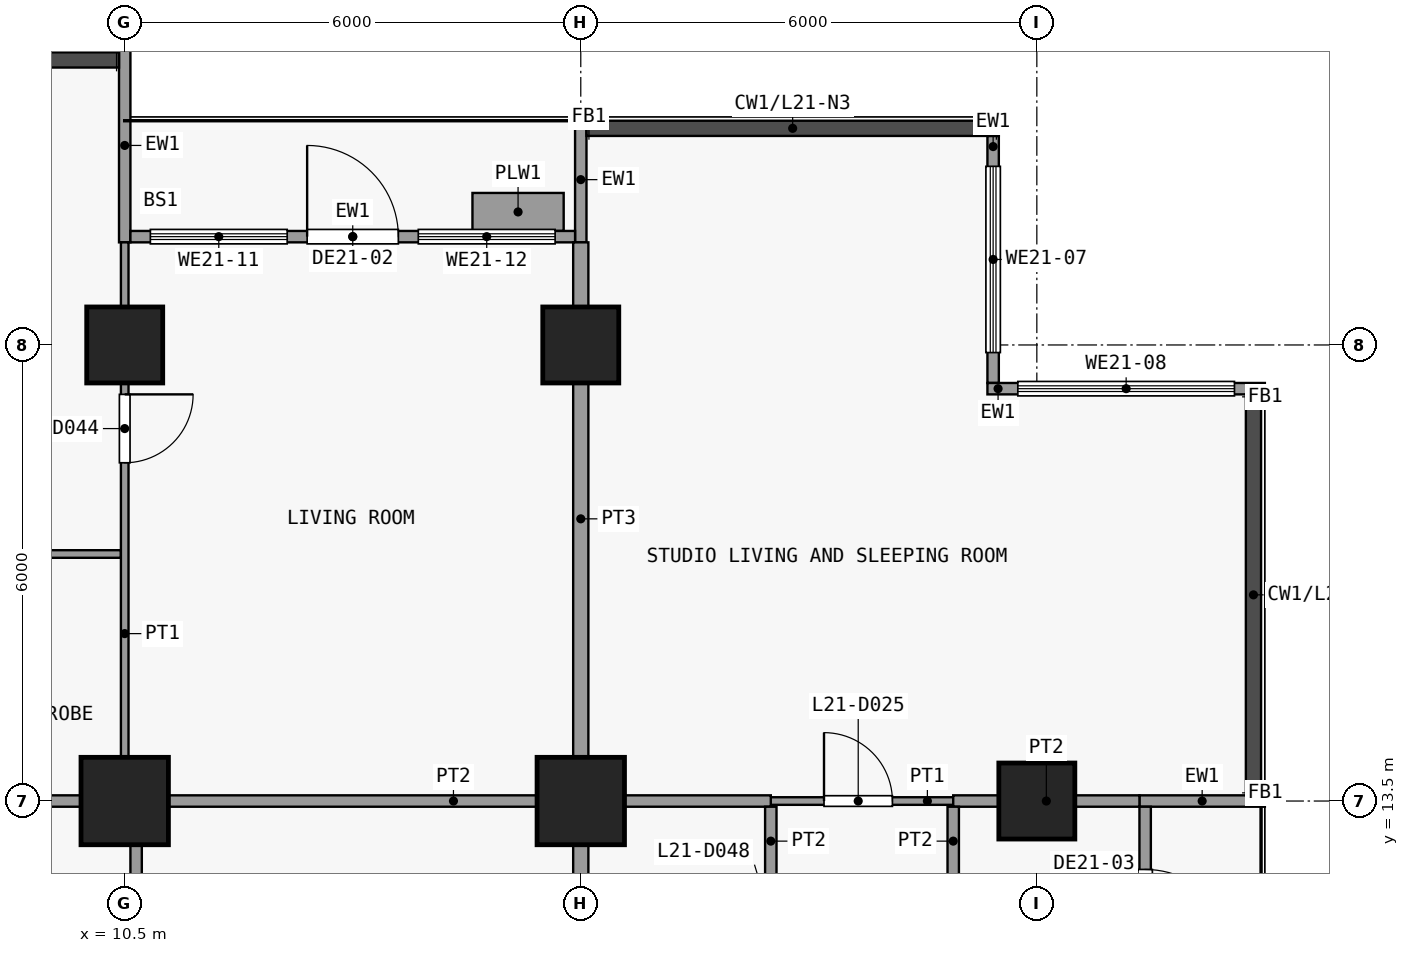
"""IFC4 building model, lengths in metres.
Left out: names, types, materials, properties, quantities, classifications, styles, units other than length and angle.
Written with IfcOpenShell. Run it as: python <this file> out.ifc"""

import sys

from ifc_helpers import new_model, si_unit, direction, frame, frame_2d, origin, origin_2d, place, context, subcontext, project, spatial, rectangle, extrude, element, fill, save


model = new_model("IFC4")
c1 = context("Model", 3, precision=1e-05, world=origin(), true_north=direction((0.0, 1.0)))
c2 = subcontext(c1, "Body", "Model", "MODEL_VIEW")
j1 = project(units=[si_unit("LENGTHUNIT", "METRE"), si_unit("PLANEANGLEUNIT", "RADIAN")], contexts=[c1])
p1 = place(None, origin())
s1 = spatial("IfcSite", under=j1, at=p1, CompositionType="ELEMENT")
p2 = place(p1, origin())
s2 = spatial("IfcBuilding", under=s1, at=p2, CompositionType="ELEMENT")
p3 = place(p2, frame((0.0, 0.0, 88.3)))
s3 = spatial("IfcBuildingStorey", under=s2, at=p3, CompositionType="ELEMENT", Elevation=88.3)
p4 = place(p3, frame((10.5, 13.5, 0.0), z_axis=(0.0, 0.0, 1.0), x_axis=(1.0, 0.0, 0.0)))
e1 = element("IfcColumn", 1, at=p4, inside=s3, PredefinedType="COLUMN", context=c2, shape_type="SweptSolid", body=[
    extrude(rectangle(XDim=1.15, YDim=1.15, at=origin_2d()), origin(), (0.0, 0.0, 1.0), 3.6),
])
p5 = place(p3, frame((10.5, 19.5, 0.0), z_axis=(0.0, 0.0, 1.0), x_axis=(1.0, 0.0, 0.0)))
e2 = element("IfcColumn", 2, at=p5, inside=s3, PredefinedType="COLUMN", context=c2, shape_type="SweptSolid", body=[
    extrude(rectangle(XDim=1.0, YDim=1.0, at=origin_2d()), origin(), (0.0, 0.0, 1.0), 3.6),
])
p6 = place(p3, frame((16.5, 13.5, 0.0), z_axis=(0.0, 0.0, 1.0), x_axis=(1.0, 0.0, 0.0)))
e3 = element("IfcColumn", 3, at=p6, inside=s3, PredefinedType="COLUMN", context=c2, shape_type="SweptSolid", body=[
    extrude(rectangle(XDim=1.15, YDim=1.15, at=origin_2d()), origin(), (0.0, 0.0, 1.0), 3.6),
])
for number, where, z_axis, x_axis in (
    (4, (16.5, 19.5, 0.0), (0.0, 0.0, 1.0), (1.0, 0.0, 0.0)),
    (5, (22.5, 13.5, 0.0), (0.0, 0.0, 1.0), (1.0, 0.0, 0.0)),
):
    element("IfcColumn", number, at=place(p3, frame(where, z_axis=z_axis, x_axis=x_axis)), inside=s3, PredefinedType="COLUMN", context=c2, shape_type="SweptSolid", body=[
        extrude(rectangle(XDim=1.0, YDim=1.0, at=origin_2d()), origin(), (0.0, 0.0, 1.0), 3.6),
    ])
p7 = place(p3, frame((21.925, 22.25, 0.0), z_axis=(0.0, 0.0, 1.0), x_axis=(0.0, -1.0, 0.0)))
e6 = element("IfcWall", 6, at=p7, inside=s3, PredefinedType="SOLIDWALL", context=c2, shape_type="SweptSolid", body=[
    extrude(rectangle(XDim=3.25, YDim=0.15, at=frame_2d((1.625, 0.0))), origin(), (0.0, 0.0, 1.0), 3.3),
])
p8 = place(p7, frame((0.4, 0.0, 0.9)))
e7 = element("IfcOpeningElement", 7, at=p8, cuts=e6, PredefinedType="OPENING", context=c2, shape_type="SweptSolid", body=[
    extrude(rectangle(XDim=2.45, YDim=2.4, at=frame_2d((1.225, 1.2))), frame((0.0, 0.085, 0.0), z_axis=(0.0, -1.0, 0.0), x_axis=(1.0, 0.0, 0.0)), (0.0, 0.0, 1.0), 0.17),
])
p9 = place(p3, frame((21.85, 18.925, 0.0), z_axis=(0.0, 0.0, 1.0), x_axis=(1.0, 0.0, 0.0)))
e8 = element("IfcWall", 8, at=p9, inside=s3, PredefinedType="SOLIDWALL", context=c2, shape_type="SweptSolid", body=[
    extrude(rectangle(XDim=3.65, YDim=0.15, at=frame_2d((1.825, 0.0))), origin(), (0.0, 0.0, 1.0), 3.3),
])
p10 = place(p9, frame((0.4, 0.0, 0.9)))
e9 = element("IfcOpeningElement", 9, at=p10, cuts=e8, PredefinedType="OPENING", context=c2, shape_type="SweptSolid", body=[
    extrude(rectangle(XDim=2.85, YDim=2.4, at=frame_2d((1.425, 1.2))), frame((0.0, 0.085, 0.0), z_axis=(0.0, -1.0, 0.0), x_axis=(1.0, 0.0, 0.0)), (0.0, 0.0, 1.0), 0.17),
])
p11 = place(p3, frame((10.5, 20.85, 0.0), z_axis=(0.0, 0.0, 1.0), x_axis=(0.0, 1.0, 0.0)))
e10 = element("IfcWall", 10, at=p11, inside=s3, PredefinedType="SOLIDWALL", context=c2, shape_type="SweptSolid", body=[
    extrude(rectangle(XDim=2.55, YDim=0.15, at=frame_2d((1.275, 0.0))), origin(), (0.0, 0.0, 1.0), 3.3),
])
p12 = place(p3, frame((16.5, 20.85, 0.0), z_axis=(0.0, 0.0, 1.0), x_axis=(0.0, 1.0, 0.0)))
e11 = element("IfcWall", 11, at=p12, inside=s3, PredefinedType="SOLIDWALL", context=c2, shape_type="SweptSolid", body=[
    extrude(rectangle(XDim=1.65, YDim=0.15, at=frame_2d((0.825, 0.0))), origin(), (0.0, 0.0, 1.0), 3.3),
])
p13 = place(p3, frame((10.575, 20.925, 0.0), z_axis=(0.0, 0.0, 1.0), x_axis=(1.0, 0.0, 0.0)))
e12 = element("IfcWall", 12, at=p13, inside=s3, PredefinedType="SOLIDWALL", context=c2, shape_type="SweptSolid", body=[
    extrude(rectangle(XDim=5.85, YDim=0.15, at=frame_2d((2.925, 0.0))), origin(), (0.0, 0.0, 1.0), 3.3),
])
p14 = place(p13, frame((2.325, 0.0, 0.0)))
e13 = element("IfcOpeningElement", 13, at=p14, cuts=e12, PredefinedType="OPENING", context=c2, shape_type="SweptSolid", body=[
    extrude(rectangle(XDim=1.2, YDim=2.4, at=frame_2d((0.6, 1.2))), frame((0.0, 0.085, 0.0), z_axis=(0.0, -1.0, 0.0), x_axis=(1.0, 0.0, 0.0)), (0.0, 0.0, 1.0), 0.17),
])
p15 = place(p13, frame((0.262, 0.0, 0.9)))
e14 = element("IfcOpeningElement", 14, at=p15, cuts=e12, PredefinedType="OPENING", context=c2, shape_type="SweptSolid", body=[
    extrude(rectangle(XDim=1.8, YDim=2.1, at=frame_2d((0.9, 1.05))), frame((0.0, 0.085, 0.0), z_axis=(0.0, -1.0, 0.0), x_axis=(1.0, 0.0, 0.0)), (0.0, 0.0, 1.0), 0.17),
])
p16 = place(p13, frame((3.788, 0.0, 0.9)))
e15 = element("IfcOpeningElement", 15, at=p16, cuts=e12, PredefinedType="OPENING", context=c2, shape_type="SweptSolid", body=[
    extrude(rectangle(XDim=1.8, YDim=2.1, at=frame_2d((0.9, 1.05))), frame((0.0, 0.085, 0.0), z_axis=(0.0, -1.0, 0.0), x_axis=(1.0, 0.0, 0.0)), (0.0, 0.0, 1.0), 0.17),
])
p17 = place(p3, frame((15.075, 21.25, 0.0), z_axis=(0.0, 0.0, 1.0), x_axis=(1.0, 0.0, 0.0)))
e16 = element("IfcWall", 16, at=p17, inside=s3, PredefinedType="USERDEFINED", context=c2, shape_type="SweptSolid", body=[
    extrude(rectangle(XDim=1.2, YDim=0.5, at=frame_2d((0.6, 0.0))), origin(), (0.0, 0.0, 1.0), 0.9),
])
p18 = place(p3, frame((23.85, 13.5, 0.0), z_axis=(0.0, 0.0, 1.0), x_axis=(1.0, 0.0, 0.0)))
e17 = element("IfcWall", 17, at=p18, inside=s3, PredefinedType="SOLIDWALL", context=c2, shape_type="SweptSolid", body=[
    extrude(rectangle(XDim=1.65, YDim=0.15, at=frame_2d((0.825, 0.0))), origin(), (0.0, 0.0, 1.0), 3.3),
])
p19 = place(p3, frame((23.925, 13.425, 0.0), z_axis=(0.0, 0.0, 1.0), x_axis=(0.0, -1.0, 0.0)))
e18 = element("IfcWall", 18, at=p19, inside=s3, PredefinedType="SOLIDWALL", context=c2, shape_type="SweptSolid", body=[
    extrude(rectangle(XDim=5.85, YDim=0.15, at=frame_2d((2.925, 0.0))), origin(), (0.0, 0.0, 1.0), 3.3),
])
p20 = place(p19, frame((0.825, 0.0, 0.0)))
e19 = element("IfcOpeningElement", 19, at=p20, cuts=e18, PredefinedType="OPENING", context=c2, shape_type="SweptSolid", body=[
    extrude(rectangle(XDim=1.2, YDim=2.4, at=frame_2d((0.6, 1.2))), frame((0.0, 0.085, 0.0), z_axis=(0.0, -1.0, 0.0), x_axis=(1.0, 0.0, 0.0)), (0.0, 0.0, 1.0), 0.17),
])
p21 = place(p19, frame((3.038, 0.0, 0.9)))
e20 = element("IfcOpeningElement", 20, at=p21, cuts=e18, PredefinedType="OPENING", context=c2, shape_type="SweptSolid", body=[
    extrude(rectangle(XDim=1.8, YDim=2.1, at=frame_2d((0.9, 1.05))), frame((0.0, 0.085, 0.0), z_axis=(0.0, -1.0, 0.0), x_axis=(1.0, 0.0, 0.0)), (0.0, 0.0, 1.0), 0.17),
])
p22 = place(p3, frame((19.0, 13.5, 0.0), z_axis=(0.0, 0.0, 1.0), x_axis=(1.0, 0.0, 0.0)))
e21 = element("IfcWall", 21, at=p22, inside=s3, PredefinedType="PARTITIONING", context=c2, shape_type="SweptSolid", body=[
    extrude(rectangle(XDim=2.4, YDim=0.1, at=frame_2d((1.2, 0.0))), origin(), (0.0, 0.0, 1.0), 3.3),
])
p23 = place(p22, frame((0.7, 0.0, 0.0)))
e22 = element("IfcOpeningElement", 22, at=p23, cuts=e21, PredefinedType="OPENING", context=c2, shape_type="SweptSolid", body=[
    extrude(rectangle(XDim=0.9, YDim=2.1, at=frame_2d((0.45, 1.05))), frame((0.0, 0.06, 0.0), z_axis=(0.0, -1.0, 0.0), x_axis=(1.0, 0.0, 0.0)), (0.0, 0.0, 1.0), 0.12),
])
p24 = place(p3, frame((0.4, 13.5, 0.0), z_axis=(0.0, 0.0, 1.0), x_axis=(1.0, 0.0, 0.0)))
e23 = element("IfcWall", 23, at=p24, inside=s3, PredefinedType="PARTITIONING", context=c2, shape_type="SweptSolid", body=[
    extrude(rectangle(XDim=10.1, YDim=0.15, at=frame_2d((5.05, 0.0))), origin(), (0.0, 0.0, 1.0), 3.3),
])
p25 = place(p3, frame((10.65, 13.5, 0.0), z_axis=(0.0, 0.0, 1.0), x_axis=(1.0, 0.0, 0.0)))
e24 = element("IfcWall", 24, at=p25, inside=s3, PredefinedType="PARTITIONING", context=c2, shape_type="SweptSolid", body=[
    extrude(rectangle(XDim=8.35, YDim=0.15, at=frame_2d((4.175, 0.0))), origin(), (0.0, 0.0, 1.0), 3.3),
])
p26 = place(p3, frame((21.4, 13.5, 0.0), z_axis=(0.0, 0.0, 1.0), x_axis=(1.0, 0.0, 0.0)))
e25 = element("IfcWall", 25, at=p26, inside=s3, PredefinedType="PARTITIONING", context=c2, shape_type="SweptSolid", body=[
    extrude(rectangle(XDim=2.45, YDim=0.15, at=frame_2d((1.225, 0.0))), origin(), (0.0, 0.0, 1.0), 3.3),
])
p27 = place(p3, frame((7.2, 16.75, 0.0), z_axis=(0.0, 0.0, 1.0), x_axis=(1.0, 0.0, 0.0)))
e26 = element("IfcWall", 26, at=p27, inside=s3, PredefinedType="PARTITIONING", context=c2, shape_type="SweptSolid", body=[
    extrude(rectangle(XDim=3.25, YDim=0.1, at=frame_2d((1.625, 0.0))), origin(), (0.0, 0.0, 1.0), 3.3),
])
p28 = place(p27, frame((1.2, 0.0, 0.0)))
e27 = element("IfcOpeningElement", 27, at=p28, cuts=e26, PredefinedType="OPENING", context=c2, shape_type="SweptSolid", body=[
    extrude(rectangle(XDim=0.9, YDim=2.1, at=frame_2d((0.45, 1.05))), frame((0.0, 0.06, 0.0), z_axis=(0.0, -1.0, 0.0), x_axis=(1.0, 0.0, 0.0)), (0.0, 0.0, 1.0), 0.12),
])
p29 = place(p3, frame((10.5, 13.575, 0.0), z_axis=(0.0, 0.0, 1.0), x_axis=(0.0, 1.0, 0.0)))
e28 = element("IfcWall", 28, at=p29, inside=s3, PredefinedType="PARTITIONING", context=c2, shape_type="SweptSolid", body=[
    extrude(rectangle(XDim=7.275, YDim=0.1, at=frame_2d((3.638, 0.0))), origin(), (0.0, 0.0, 1.0), 3.3),
])
p30 = place(p29, frame((4.375, 0.0, 0.0)))
e29 = element("IfcOpeningElement", 29, at=p30, cuts=e28, PredefinedType="OPENING", context=c2, shape_type="SweptSolid", body=[
    extrude(rectangle(XDim=0.9, YDim=2.1, at=frame_2d((0.45, 1.05))), frame((0.0, 0.06, 0.0), z_axis=(0.0, -1.0, 0.0), x_axis=(1.0, 0.0, 0.0)), (0.0, 0.0, 1.0), 0.12),
])
p31 = place(p3, frame((10.65, 10.6, 0.0), z_axis=(0.0, 0.0, 1.0), x_axis=(0.0, 1.0, 0.0)))
e30 = element("IfcWall", 30, at=p31, inside=s3, PredefinedType="PARTITIONING", context=c2, shape_type="SweptSolid", body=[
    extrude(rectangle(XDim=2.825, YDim=0.15, at=frame_2d((1.413, 0.0))), origin(), (0.0, 0.0, 1.0), 3.3),
])
p32 = place(p31, frame((1.0, 0.0, 0.0)))
e31 = element("IfcOpeningElement", 31, at=p32, cuts=e30, PredefinedType="OPENING", context=c2, shape_type="SweptSolid", body=[
    extrude(rectangle(XDim=0.9, YDim=2.1, at=frame_2d((0.45, 1.05))), frame((0.0, 0.085, 0.0), z_axis=(0.0, -1.0, 0.0), x_axis=(1.0, 0.0, 0.0)), (0.0, 0.0, 1.0), 0.17),
])
p33 = place(p3, frame((16.5, 10.6, 0.0), z_axis=(0.0, 0.0, 1.0), x_axis=(0.0, 1.0, 0.0)))
e32 = element("IfcWall", 32, at=p33, inside=s3, PredefinedType="PARTITIONING", context=c2, shape_type="SweptSolid", body=[
    extrude(rectangle(XDim=2.825, YDim=0.2, at=frame_2d((1.413, 0.0))), origin(), (0.0, 0.0, 1.0), 3.3),
])
p34 = place(p3, frame((16.5, 13.575, 0.0), z_axis=(0.0, 0.0, 1.0), x_axis=(0.0, 1.0, 0.0)))
e33 = element("IfcWall", 33, at=p34, inside=s3, PredefinedType="PARTITIONING", context=c2, shape_type="SweptSolid", body=[
    extrude(rectangle(XDim=7.275, YDim=0.2, at=frame_2d((3.638, 0.0))), origin(), (0.0, 0.0, 1.0), 3.3),
])
p35 = place(p3, frame((19.0, 10.6, 0.0), z_axis=(0.0, 0.0, 1.0), x_axis=(0.0, 1.0, 0.0)))
e34 = element("IfcWall", 34, at=p35, inside=s3, PredefinedType="PARTITIONING", context=c2, shape_type="SweptSolid", body=[
    extrude(rectangle(XDim=2.825, YDim=0.15, at=frame_2d((1.413, 0.0))), origin(), (0.0, 0.0, 1.0), 3.3),
])
p36 = place(p35, frame((0.9, 0.0, 0.0)))
e35 = element("IfcOpeningElement", 35, at=p36, cuts=e34, PredefinedType="OPENING", context=c2, shape_type="SweptSolid", body=[
    extrude(rectangle(XDim=0.9, YDim=2.1, at=frame_2d((0.45, 1.05))), frame((0.0, 0.085, 0.0), z_axis=(0.0, -1.0, 0.0), x_axis=(1.0, 0.0, 0.0)), (0.0, 0.0, 1.0), 0.17),
])
p37 = place(p3, frame((21.4, 10.6, 0.0), z_axis=(0.0, 0.0, 1.0), x_axis=(0.0, 1.0, 0.0)))
e36 = element("IfcWall", 36, at=p37, inside=s3, PredefinedType="PARTITIONING", context=c2, shape_type="SweptSolid", body=[
    extrude(rectangle(XDim=2.825, YDim=0.15, at=frame_2d((1.413, 0.0))), origin(), (0.0, 0.0, 1.0), 3.3),
])
p38 = place(p37, frame((0.9, 0.0, 0.0)))
e37 = element("IfcOpeningElement", 37, at=p38, cuts=e36, PredefinedType="OPENING", context=c2, shape_type="SweptSolid", body=[
    extrude(rectangle(XDim=0.9, YDim=2.1, at=frame_2d((0.45, 1.05))), frame((0.0, 0.085, 0.0), z_axis=(0.0, -1.0, 0.0), x_axis=(1.0, 0.0, 0.0)), (0.0, 0.0, 1.0), 0.17),
])
p39 = place(p8, origin())
e38 = element("IfcWindow", 38, at=p39, inside=s3, PartitioningType="SINGLE_PANEL", PredefinedType="WINDOW", context=c2, shape_type="SweptSolid", body=[
    extrude(rectangle(XDim=2.45, YDim=2.4, at=frame_2d((1.225, 1.2))), frame((0.0, 0.03, 0.0), z_axis=(0.0, -1.0, 0.0), x_axis=(1.0, 0.0, 0.0)), (0.0, 0.0, 1.0), 0.06),
])
fill(e7, e38)
p40 = place(p10, origin())
e39 = element("IfcWindow", 39, at=p40, inside=s3, PartitioningType="SINGLE_PANEL", PredefinedType="WINDOW", context=c2, shape_type="SweptSolid", body=[
    extrude(rectangle(XDim=2.85, YDim=2.4, at=frame_2d((1.425, 1.2))), frame((0.0, 0.03, 0.0), z_axis=(0.0, -1.0, 0.0), x_axis=(1.0, 0.0, 0.0)), (0.0, 0.0, 1.0), 0.06),
])
fill(e9, e39)
p41 = place(p14, origin())
e40 = element("IfcDoor", 40, at=p41, inside=s3, OperationType="SINGLE_SWING_LEFT", PredefinedType="DOOR", context=c2, shape_type="SweptSolid", body=[
    extrude(rectangle(XDim=1.2, YDim=2.4, at=frame_2d((0.6, 1.2))), frame((0.0, 0.025, 0.0), z_axis=(0.0, -1.0, 0.0), x_axis=(1.0, 0.0, 0.0)), (0.0, 0.0, 1.0), 0.05),
])
fill(e13, e40)
p42 = place(p15, origin())
e41 = element("IfcWindow", 41, at=p42, inside=s3, PartitioningType="SINGLE_PANEL", PredefinedType="WINDOW", context=c2, shape_type="SweptSolid", body=[
    extrude(rectangle(XDim=1.8, YDim=2.1, at=frame_2d((0.9, 1.05))), frame((0.0, 0.03, 0.0), z_axis=(0.0, -1.0, 0.0), x_axis=(1.0, 0.0, 0.0)), (0.0, 0.0, 1.0), 0.06),
])
fill(e14, e41)
p43 = place(p16, origin())
e42 = element("IfcWindow", 42, at=p43, inside=s3, PartitioningType="SINGLE_PANEL", PredefinedType="WINDOW", context=c2, shape_type="SweptSolid", body=[
    extrude(rectangle(XDim=1.8, YDim=2.1, at=frame_2d((0.9, 1.05))), frame((0.0, 0.03, 0.0), z_axis=(0.0, -1.0, 0.0), x_axis=(1.0, 0.0, 0.0)), (0.0, 0.0, 1.0), 0.06),
])
fill(e15, e42)
p44 = place(p20, origin())
e43 = element("IfcDoor", 43, at=p44, inside=s3, OperationType="SINGLE_SWING_RIGHT", PredefinedType="DOOR", context=c2, shape_type="SweptSolid", body=[
    extrude(rectangle(XDim=1.2, YDim=2.4, at=frame_2d((0.6, 1.2))), frame((0.0, 0.025, 0.0), z_axis=(0.0, -1.0, 0.0), x_axis=(1.0, 0.0, 0.0)), (0.0, 0.0, 1.0), 0.05),
])
fill(e19, e43)
p45 = place(p23, origin())
e44 = element("IfcDoor", 44, at=p45, inside=s3, OperationType="SINGLE_SWING_RIGHT", PredefinedType="DOOR", context=c2, shape_type="SweptSolid", body=[
    extrude(rectangle(XDim=0.9, YDim=2.1, at=frame_2d((0.45, 1.05))), frame((0.0, 0.025, 0.0), z_axis=(0.0, -1.0, 0.0), x_axis=(1.0, 0.0, 0.0)), (0.0, 0.0, 1.0), 0.05),
])
fill(e22, e44)
p46 = place(p30, origin())
e45 = element("IfcDoor", 45, at=p46, inside=s3, OperationType="SINGLE_SWING_RIGHT", PredefinedType="DOOR", context=c2, shape_type="SweptSolid", body=[
    extrude(rectangle(XDim=0.9, YDim=2.1, at=frame_2d((0.45, 1.05))), frame((0.0, 0.025, 0.0), z_axis=(0.0, -1.0, 0.0), x_axis=(1.0, 0.0, 0.0)), (0.0, 0.0, 1.0), 0.05),
])
fill(e29, e45)
save(model, sys.argv[1])
